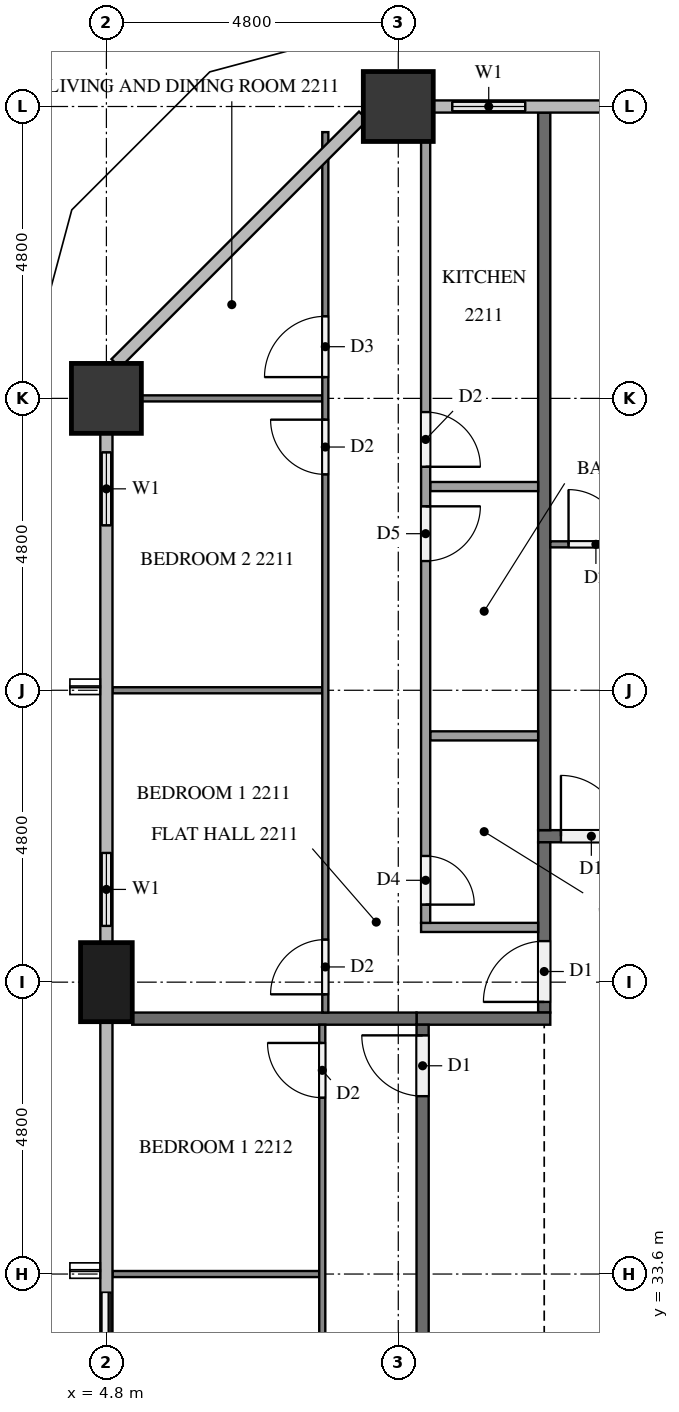
"""IFC4 building model, lengths in metres.
Left out: names, types, materials, properties, quantities, classifications, styles, units other than length and angle.
Written with IfcOpenShell. Run it as: python <this file> out.ifc"""

import sys

from ifc_helpers import new_model, si_unit, direction, frame, frame_2d, origin, origin_2d, place, context, subcontext, project, spatial, rectangle, extrude, element, fill, save


model = new_model("IFC4")
c1 = context("Model", 3, precision=1e-05, world=origin(), true_north=direction((0.0, 1.0)))
c2 = subcontext(c1, "Body", "Model", "MODEL_VIEW")
j1 = project(units=[si_unit("LENGTHUNIT", "METRE"), si_unit("PLANEANGLEUNIT", "RADIAN")], contexts=[c1])
p1 = place(None, origin())
s1 = spatial("IfcSite", under=j1, at=p1, CompositionType="ELEMENT")
p2 = place(p1, origin())
s2 = spatial("IfcBuilding", under=s1, at=p2, CompositionType="ELEMENT")
p3 = place(p2, frame((0.0, 0.0, 89.2)))
s3 = spatial("IfcBuildingStorey", under=s2, at=p3, CompositionType="ELEMENT", Elevation=89.2)
for number, where, z_axis, x_axis in (
    (1, (9.6, 52.8, 0.0), (0.0, 0.0, 1.0), (1.0, 0.0, 0.0)),
    (2, (4.8, 48.0, 0.0), (0.0, 0.0, 1.0), (1.0, 0.0, 0.0)),
):
    element("IfcColumn", number, at=place(p3, frame(where, z_axis=z_axis, x_axis=x_axis)), inside=s3, PredefinedType="COLUMN", context=c2, shape_type="SweptSolid", body=[
        extrude(rectangle(XDim=1.15, YDim=1.15, at=origin_2d()), origin(), (0.0, 0.0, 1.0), 3.2),
    ])
p4 = place(p3, frame((4.8, 38.4, 0.0), z_axis=(0.0, 0.0, 1.0), x_axis=(0.0, 1.0, 0.0)))
e3 = element("IfcColumn", 3, at=p4, inside=s3, PredefinedType="COLUMN", context=c2, shape_type="SweptSolid", body=[
    extrude(rectangle(XDim=1.3, YDim=0.85, at=origin_2d()), origin(), (0.0, 0.0, 1.0), 3.2),
])
p5 = place(p3, frame((12.0, 52.8, 0.0), z_axis=(0.0, 0.0, 1.0), x_axis=(-1.0, 0.0, 0.0)))
e4 = element("IfcWall", 4, at=p5, inside=s3, PredefinedType="SOLIDWALL", context=c2, shape_type="SweptSolid", body=[
    extrude(rectangle(XDim=1.825, YDim=0.15, at=frame_2d((0.913, 0.0))), origin(), (0.0, 0.0, 1.0), 3.2),
])
p6 = place(p5, frame((0.312, 0.0, 0.9)))
e5 = element("IfcOpeningElement", 5, at=p6, cuts=e4, PredefinedType="OPENING", context=c2, shape_type="SweptSolid", body=[
    extrude(rectangle(XDim=1.2, YDim=1.4, at=frame_2d((0.6, 0.7))), frame((0.0, 0.085, 0.0), z_axis=(0.0, -1.0, 0.0), x_axis=(1.0, 0.0, 0.0)), (0.0, 0.0, 1.0), 0.17),
])
p7 = place(p3, frame((4.8, 47.425, 0.0), z_axis=(0.0, 0.0, 1.0), x_axis=(0.0, -1.0, 0.0)))
e6 = element("IfcWall", 6, at=p7, inside=s3, PredefinedType="SOLIDWALL", context=c2, shape_type="SweptSolid", body=[
    extrude(rectangle(XDim=1.825, YDim=0.15, at=frame_2d((0.913, 0.0))), origin(), (0.0, 0.0, 1.0), 3.2),
])
p8 = place(p7, frame((0.312, 0.0, 0.9)))
e7 = element("IfcOpeningElement", 7, at=p8, cuts=e6, PredefinedType="OPENING", context=c2, shape_type="SweptSolid", body=[
    extrude(rectangle(XDim=1.2, YDim=1.4, at=frame_2d((0.6, 0.7))), frame((0.0, 0.085, 0.0), z_axis=(0.0, -1.0, 0.0), x_axis=(1.0, 0.0, 0.0)), (0.0, 0.0, 1.0), 0.17),
])
p9 = place(p3, frame((4.8, 40.8, 0.0), z_axis=(0.0, 0.0, 1.0), x_axis=(0.0, -1.0, 0.0)))
e8 = element("IfcWall", 8, at=p9, inside=s3, PredefinedType="SOLIDWALL", context=c2, shape_type="SweptSolid", body=[
    extrude(rectangle(XDim=1.75, YDim=0.15, at=frame_2d((0.875, 0.0))), origin(), (0.0, 0.0, 1.0), 3.2),
])
p10 = place(p9, frame((0.275, 0.0, 0.9)))
e9 = element("IfcOpeningElement", 9, at=p10, cuts=e8, PredefinedType="OPENING", context=c2, shape_type="SweptSolid", body=[
    extrude(rectangle(XDim=1.2, YDim=1.4, at=frame_2d((0.6, 0.7))), frame((0.0, 0.085, 0.0), z_axis=(0.0, -1.0, 0.0), x_axis=(1.0, 0.0, 0.0)), (0.0, 0.0, 1.0), 0.17),
])
p11 = place(p3, frame((4.8, 33.6, 0.0), z_axis=(0.0, 0.0, 1.0), x_axis=(0.0, -1.0, 0.0)))
e10 = element("IfcWall", 10, at=p11, inside=s3, PredefinedType="SOLIDWALL", context=c2, shape_type="SweptSolid", body=[
    extrude(rectangle(XDim=2.4, YDim=0.15, at=frame_2d((1.2, 0.0))), origin(), (0.0, 0.0, 1.0), 3.2),
])
p12 = place(p11, frame((0.3, 0.0, 0.0)))
e11 = element("IfcOpeningElement", 11, at=p12, cuts=e10, PredefinedType="OPENING", context=c2, shape_type="SweptSolid", body=[
    extrude(rectangle(XDim=1.8, YDim=2.4, at=frame_2d((0.9, 1.2))), frame((0.0, 0.085, 0.0), z_axis=(0.0, -1.0, 0.0), x_axis=(1.0, 0.0, 0.0)), (0.0, 0.0, 1.0), 0.17),
])
p13 = place(p3, frame((11.9, 40.8, 0.0), z_axis=(0.0, 0.0, 1.0), x_axis=(1.0, 0.0, 0.0)))
e12 = element("IfcWall", 12, at=p13, inside=s3, PredefinedType="PARTITIONING", context=c2, shape_type="SweptSolid", body=[
    extrude(rectangle(XDim=38.6, YDim=0.2, at=frame_2d((19.3, 0.0))), origin(), (0.0, 0.0, 1.0), 3.2),
])
p14 = place(p13, frame((31.575, 0.0, 0.0)))
e13 = element("IfcOpeningElement", 13, at=p14, cuts=e12, PredefinedType="OPENING", context=c2, shape_type="SweptSolid", body=[
    extrude(rectangle(XDim=1.0, YDim=2.1, at=frame_2d((0.5, 1.05))), frame((0.0, 0.11, 0.0), z_axis=(0.0, -1.0, 0.0), x_axis=(1.0, 0.0, 0.0)), (0.0, 0.0, 1.0), 0.22),
])
p15 = place(p13, frame((14.775, 0.0, 0.0)))
e14 = element("IfcOpeningElement", 14, at=p15, cuts=e12, PredefinedType="OPENING", context=c2, shape_type="SweptSolid", body=[
    extrude(rectangle(XDim=1.0, YDim=2.1, at=frame_2d((0.5, 1.05))), frame((0.0, 0.11, 0.0), z_axis=(0.0, -1.0, 0.0), x_axis=(1.0, 0.0, 0.0)), (0.0, 0.0, 1.0), 0.22),
])
p16 = place(p13, frame((0.375, 0.0, 0.0)))
e15 = element("IfcOpeningElement", 15, at=p16, cuts=e12, PredefinedType="OPENING", context=c2, shape_type="SweptSolid", body=[
    extrude(rectangle(XDim=1.0, YDim=2.1, at=frame_2d((0.5, 1.05))), frame((0.0, 0.11, 0.0), z_axis=(0.0, -1.0, 0.0), x_axis=(1.0, 0.0, 0.0)), (0.0, 0.0, 1.0), 0.22),
])
p17 = place(p3, frame((12.0, 37.9, 0.0), z_axis=(0.0, 0.0, 1.0), x_axis=(0.0, 1.0, 0.0)))
e16 = element("IfcWall", 16, at=p17, inside=s3, PredefinedType="PARTITIONING", context=c2, shape_type="SweptSolid", body=[
    extrude(rectangle(XDim=2.8, YDim=0.2, at=frame_2d((1.4, 0.0))), origin(), (0.0, 0.0, 1.0), 3.2),
])
p18 = place(p17, frame((0.175, 0.0, 0.0)))
e17 = element("IfcOpeningElement", 17, at=p18, cuts=e16, PredefinedType="OPENING", context=c2, shape_type="SweptSolid", body=[
    extrude(rectangle(XDim=1.0, YDim=2.1, at=frame_2d((0.5, 1.05))), frame((0.0, 0.11, 0.0), z_axis=(0.0, -1.0, 0.0), x_axis=(1.0, 0.0, 0.0)), (0.0, 0.0, 1.0), 0.22),
])
p19 = place(p3, frame((12.1, 37.8, 0.0), z_axis=(0.0, 0.0, 1.0), x_axis=(-1.0, 0.0, 0.0)))
e18 = element("IfcWall", 18, at=p19, inside=s3, PredefinedType="PARTITIONING", context=c2, shape_type="SweptSolid", body=[
    extrude(rectangle(XDim=2.2, YDim=0.2, at=frame_2d((1.1, 0.0))), origin(), (0.0, 0.0, 1.0), 3.2),
])
p20 = place(p3, frame((10.0, 15.1, 0.0), z_axis=(0.0, 0.0, 1.0), x_axis=(0.0, 1.0, 0.0)))
e19 = element("IfcWall", 19, at=p20, inside=s3, PredefinedType="PARTITIONING", context=c2, shape_type="SweptSolid", body=[
    extrude(rectangle(XDim=22.6, YDim=0.2, at=frame_2d((11.3, 0.0))), origin(), (0.0, 0.0, 1.0), 3.2),
])
p21 = place(p20, frame((21.425, 0.0, 0.0)))
e20 = element("IfcOpeningElement", 20, at=p21, cuts=e19, PredefinedType="OPENING", context=c2, shape_type="SweptSolid", body=[
    extrude(rectangle(XDim=1.0, YDim=2.1, at=frame_2d((0.5, 1.05))), frame((0.0, 0.11, 0.0), z_axis=(0.0, -1.0, 0.0), x_axis=(1.0, 0.0, 0.0)), (0.0, 0.0, 1.0), 0.22),
])
p22 = place(p3, frame((12.0, 52.7, 0.0), z_axis=(0.0, 0.0, 1.0), x_axis=(0.0, -1.0, 0.0)))
e21 = element("IfcWall", 21, at=p22, inside=s3, PredefinedType="PARTITIONING", context=c2, shape_type="SweptSolid", body=[
    extrude(rectangle(XDim=11.8, YDim=0.2, at=frame_2d((5.9, 0.0))), origin(), (0.0, 0.0, 1.0), 3.2),
])
p23 = place(p3, frame((5.225, 37.8, 0.0), z_axis=(0.0, 0.0, 1.0), x_axis=(1.0, 0.0, 0.0)))
e22 = element("IfcWall", 22, at=p23, inside=s3, PredefinedType="PARTITIONING", context=c2, shape_type="SweptSolid", body=[
    extrude(rectangle(XDim=4.675, YDim=0.2, at=frame_2d((2.337, 0.0))), origin(), (0.0, 0.0, 1.0), 3.2),
])
p24 = place(p3, frame((12.1, 45.6, 0.0), z_axis=(0.0, 0.0, 1.0), x_axis=(1.0, 0.0, 0.0)))
e23 = element("IfcWall", 23, at=p24, inside=s3, PredefinedType="PARTITIONING", context=c2, shape_type="SweptSolid", body=[
    extrude(rectangle(XDim=14.2, YDim=0.1, at=frame_2d((7.1, 0.0))), origin(), (0.0, 0.0, 1.0), 3.2),
])
p25 = place(p24, frame((0.3, 0.0, 0.0)))
e24 = element("IfcOpeningElement", 24, at=p25, cuts=e23, PredefinedType="OPENING", context=c2, shape_type="SweptSolid", body=[
    extrude(rectangle(XDim=0.9, YDim=2.1, at=frame_2d((0.45, 1.05))), frame((0.0, 0.06, 0.0), z_axis=(0.0, -1.0, 0.0), x_axis=(1.0, 0.0, 0.0)), (0.0, 0.0, 1.0), 0.12),
])
p26 = place(p24, frame((8.15, 0.0, 0.0)))
e25 = element("IfcOpeningElement", 25, at=p26, cuts=e23, PredefinedType="OPENING", context=c2, shape_type="SweptSolid", body=[
    extrude(rectangle(XDim=1.0, YDim=2.1, at=frame_2d((0.5, 1.05))), frame((0.0, 0.06, 0.0), z_axis=(0.0, -1.0, 0.0), x_axis=(1.0, 0.0, 0.0)), (0.0, 0.0, 1.0), 0.12),
])
p27 = place(p24, frame((9.85, 0.0, 0.0)))
e26 = element("IfcOpeningElement", 26, at=p27, cuts=e23, PredefinedType="OPENING", context=c2, shape_type="SweptSolid", body=[
    extrude(rectangle(XDim=0.9, YDim=2.1, at=frame_2d((0.45, 1.05))), frame((0.0, 0.06, 0.0), z_axis=(0.0, -1.0, 0.0), x_axis=(1.0, 0.0, 0.0)), (0.0, 0.0, 1.0), 0.12),
])
p28 = place(p3, frame((8.35, 43.2, 0.0), z_axis=(0.0, 0.0, 1.0), x_axis=(-1.0, 0.0, 0.0)))
e27 = element("IfcWall", 27, at=p28, inside=s3, PredefinedType="PARTITIONING", context=c2, shape_type="SweptSolid", body=[
    extrude(rectangle(XDim=3.45, YDim=0.1, at=frame_2d((1.725, 0.0))), origin(), (0.0, 0.0, 1.0), 3.2),
])
p29 = place(p3, frame((8.35, 48.0, 0.0), z_axis=(0.0, 0.0, 1.0), x_axis=(-1.0, 0.0, 0.0)))
e28 = element("IfcWall", 28, at=p29, inside=s3, PredefinedType="PARTITIONING", context=c2, shape_type="SweptSolid", body=[
    extrude(rectangle(XDim=2.975, YDim=0.1, at=frame_2d((1.488, 0.0))), origin(), (0.0, 0.0, 1.0), 3.2),
])
p30 = place(p3, frame((8.4, 37.9, 0.0), z_axis=(0.0, 0.0, 1.0), x_axis=(0.0, 1.0, 0.0)))
e29 = element("IfcWall", 29, at=p30, inside=s3, PredefinedType="PARTITIONING", context=c2, shape_type="SweptSolid", body=[
    extrude(rectangle(XDim=14.479, YDim=0.1, at=frame_2d((7.239, 0.0))), origin(), (0.0, 0.0, 1.0), 3.2),
])
p31 = place(p30, frame((0.3, 0.0, 0.0)))
e30 = element("IfcOpeningElement", 30, at=p31, cuts=e29, PredefinedType="OPENING", context=c2, shape_type="SweptSolid", body=[
    extrude(rectangle(XDim=0.9, YDim=2.1, at=frame_2d((0.45, 1.05))), frame((0.0, 0.06, 0.0), z_axis=(0.0, -1.0, 0.0), x_axis=(1.0, 0.0, 0.0)), (0.0, 0.0, 1.0), 0.12),
])
p32 = place(p30, frame((8.85, 0.0, 0.0)))
e31 = element("IfcOpeningElement", 31, at=p32, cuts=e29, PredefinedType="OPENING", context=c2, shape_type="SweptSolid", body=[
    extrude(rectangle(XDim=0.9, YDim=2.1, at=frame_2d((0.45, 1.05))), frame((0.0, 0.06, 0.0), z_axis=(0.0, -1.0, 0.0), x_axis=(1.0, 0.0, 0.0)), (0.0, 0.0, 1.0), 0.12),
])
p33 = place(p30, frame((10.45, 0.0, 0.0)))
e32 = element("IfcOpeningElement", 32, at=p33, cuts=e29, PredefinedType="OPENING", context=c2, shape_type="SweptSolid", body=[
    extrude(rectangle(XDim=1.0, YDim=2.1, at=frame_2d((0.5, 1.05))), frame((0.0, 0.06, 0.0), z_axis=(0.0, -1.0, 0.0), x_axis=(1.0, 0.0, 0.0)), (0.0, 0.0, 1.0), 0.12),
])
for number, where, z_axis, x_axis in (
    (33, (11.9, 42.45, 0.0), (0.0, 0.0, 1.0), (-1.0, 0.0, 0.0)),
    (34, (11.9, 46.55, 0.0), (0.0, 0.0, 1.0), (-1.0, 0.0, 0.0)),
):
    element("IfcWall", number, at=place(p3, frame(where, z_axis=z_axis, x_axis=x_axis)), inside=s3, PredefinedType="PARTITIONING", context=c2, shape_type="SweptSolid", body=[
        extrude(rectangle(XDim=1.775, YDim=0.15, at=frame_2d((0.887, 0.0))), origin(), (0.0, 0.0, 1.0), 3.2),
    ])
p34 = place(p3, frame((11.9, 39.3, 0.0), z_axis=(0.0, 0.0, 1.0), x_axis=(-1.0, 0.0, 0.0)))
e35 = element("IfcWall", 35, at=p34, inside=s3, PredefinedType="PARTITIONING", context=c2, shape_type="SweptSolid", body=[
    extrude(rectangle(XDim=1.925, YDim=0.15, at=frame_2d((0.962, 0.0))), origin(), (0.0, 0.0, 1.0), 3.2),
])
p35 = place(p3, frame((10.05, 52.225, 0.0), z_axis=(0.0, 0.0, 1.0), x_axis=(0.0, -1.0, 0.0)))
e36 = element("IfcWall", 36, at=p35, inside=s3, PredefinedType="PARTITIONING", context=c2, shape_type="SweptSolid", body=[
    extrude(rectangle(XDim=12.85, YDim=0.15, at=frame_2d((6.425, 0.0))), origin(), (0.0, 0.0, 1.0), 3.2),
])
p36 = place(p35, frame((11.75, 0.0, 0.0)))
e37 = element("IfcOpeningElement", 37, at=p36, cuts=e36, PredefinedType="OPENING", context=c2, shape_type="SweptSolid", body=[
    extrude(rectangle(XDim=0.8, YDim=2.1, at=frame_2d((0.4, 1.05))), frame((0.0, 0.085, 0.0), z_axis=(0.0, -1.0, 0.0), x_axis=(1.0, 0.0, 0.0)), (0.0, 0.0, 1.0), 0.17),
])
p37 = place(p35, frame((6.0, 0.0, 0.0)))
e38 = element("IfcOpeningElement", 38, at=p37, cuts=e36, PredefinedType="OPENING", context=c2, shape_type="SweptSolid", body=[
    extrude(rectangle(XDim=0.9, YDim=2.1, at=frame_2d((0.45, 1.05))), frame((0.0, 0.085, 0.0), z_axis=(0.0, -1.0, 0.0), x_axis=(1.0, 0.0, 0.0)), (0.0, 0.0, 1.0), 0.17),
])
p38 = place(p35, frame((4.45, 0.0, 0.0)))
e39 = element("IfcOpeningElement", 39, at=p38, cuts=e36, PredefinedType="OPENING", context=c2, shape_type="SweptSolid", body=[
    extrude(rectangle(XDim=0.9, YDim=2.1, at=frame_2d((0.45, 1.05))), frame((0.0, 0.085, 0.0), z_axis=(0.0, -1.0, 0.0), x_axis=(1.0, 0.0, 0.0)), (0.0, 0.0, 1.0), 0.17),
])
p39 = place(p3, frame((8.3, 33.6, 0.0), z_axis=(0.0, 0.0, 1.0), x_axis=(-1.0, 0.0, 0.0)))
e40 = element("IfcWall", 40, at=p39, inside=s3, PredefinedType="PARTITIONING", context=c2, shape_type="SweptSolid", body=[
    extrude(rectangle(XDim=3.4, YDim=0.1, at=frame_2d((1.7, 0.0))), origin(), (0.0, 0.0, 1.0), 3.2),
])
p40 = place(p3, frame((8.35, 15.1, 0.0), z_axis=(0.0, 0.0, 1.0), x_axis=(0.0, 1.0, 0.0)))
e41 = element("IfcWall", 41, at=p40, inside=s3, PredefinedType="PARTITIONING", context=c2, shape_type="SweptSolid", body=[
    extrude(rectangle(XDim=22.6, YDim=0.1, at=frame_2d((11.3, 0.0))), origin(), (0.0, 0.0, 1.0), 3.2),
])
p41 = place(p40, frame((21.4, 0.0, 0.0)))
e42 = element("IfcOpeningElement", 42, at=p41, cuts=e41, PredefinedType="OPENING", context=c2, shape_type="SweptSolid", body=[
    extrude(rectangle(XDim=0.9, YDim=2.1, at=frame_2d((0.45, 1.05))), frame((0.0, 0.06, 0.0), z_axis=(0.0, -1.0, 0.0), x_axis=(1.0, 0.0, 0.0)), (0.0, 0.0, 1.0), 0.12),
])
p42 = place(p40, frame((11.65, 0.0, 0.0)))
e43 = element("IfcOpeningElement", 43, at=p42, cuts=e41, PredefinedType="OPENING", context=c2, shape_type="SweptSolid", body=[
    extrude(rectangle(XDim=1.0, YDim=2.1, at=frame_2d((0.5, 1.05))), frame((0.0, 0.06, 0.0), z_axis=(0.0, -1.0, 0.0), x_axis=(1.0, 0.0, 0.0)), (0.0, 0.0, 1.0), 0.12),
])
p43 = place(p40, frame((10.05, 0.0, 0.0)))
e44 = element("IfcOpeningElement", 44, at=p43, cuts=e41, PredefinedType="OPENING", context=c2, shape_type="SweptSolid", body=[
    extrude(rectangle(XDim=0.9, YDim=2.1, at=frame_2d((0.45, 1.05))), frame((0.0, 0.06, 0.0), z_axis=(0.0, -1.0, 0.0), x_axis=(1.0, 0.0, 0.0)), (0.0, 0.0, 1.0), 0.12),
])
p44 = place(p40, frame((4.45, 0.0, 0.0)))
e45 = element("IfcOpeningElement", 45, at=p44, cuts=e41, PredefinedType="OPENING", context=c2, shape_type="SweptSolid", body=[
    extrude(rectangle(XDim=0.9, YDim=2.1, at=frame_2d((0.45, 1.05))), frame((0.0, 0.06, 0.0), z_axis=(0.0, -1.0, 0.0), x_axis=(1.0, 0.0, 0.0)), (0.0, 0.0, 1.0), 0.12),
])
p45 = place(p40, frame((2.85, 0.0, 0.0)))
e46 = element("IfcOpeningElement", 46, at=p45, cuts=e41, PredefinedType="OPENING", context=c2, shape_type="SweptSolid", body=[
    extrude(rectangle(XDim=0.9, YDim=2.1, at=frame_2d((0.45, 1.05))), frame((0.0, 0.06, 0.0), z_axis=(0.0, -1.0, 0.0), x_axis=(1.0, 0.0, 0.0)), (0.0, 0.0, 1.0), 0.12),
])
p46 = place(p40, frame((0.3, 0.0, 0.0)))
e47 = element("IfcOpeningElement", 47, at=p46, cuts=e41, PredefinedType="OPENING", context=c2, shape_type="SweptSolid", body=[
    extrude(rectangle(XDim=0.8, YDim=2.1, at=frame_2d((0.4, 1.05))), frame((0.0, 0.06, 0.0), z_axis=(0.0, -1.0, 0.0), x_axis=(1.0, 0.0, 0.0)), (0.0, 0.0, 1.0), 0.12),
])
p47 = place(p6, origin())
e48 = element("IfcWindow", 48, at=p47, inside=s3, PartitioningType="SINGLE_PANEL", PredefinedType="WINDOW", context=c2, shape_type="SweptSolid", body=[
    extrude(rectangle(XDim=1.2, YDim=1.4, at=frame_2d((0.6, 0.7))), frame((0.0, 0.03, 0.0), z_axis=(0.0, -1.0, 0.0), x_axis=(1.0, 0.0, 0.0)), (0.0, 0.0, 1.0), 0.06),
])
fill(e5, e48)
p48 = place(p8, origin())
e49 = element("IfcWindow", 49, at=p48, inside=s3, PartitioningType="SINGLE_PANEL", PredefinedType="WINDOW", context=c2, shape_type="SweptSolid", body=[
    extrude(rectangle(XDim=1.2, YDim=1.4, at=frame_2d((0.6, 0.7))), frame((0.0, 0.03, 0.0), z_axis=(0.0, -1.0, 0.0), x_axis=(1.0, 0.0, 0.0)), (0.0, 0.0, 1.0), 0.06),
])
fill(e7, e49)
p49 = place(p10, origin())
e50 = element("IfcWindow", 50, at=p49, inside=s3, PartitioningType="SINGLE_PANEL", PredefinedType="WINDOW", context=c2, shape_type="SweptSolid", body=[
    extrude(rectangle(XDim=1.2, YDim=1.4, at=frame_2d((0.6, 0.7))), frame((0.0, 0.03, 0.0), z_axis=(0.0, -1.0, 0.0), x_axis=(1.0, 0.0, 0.0)), (0.0, 0.0, 1.0), 0.06),
])
fill(e9, e50)
p50 = place(p12, origin())
e51 = element("IfcDoor", 51, at=p50, inside=s3, OperationType="SLIDING_TO_LEFT", PredefinedType="DOOR", context=c2, shape_type="SweptSolid", body=[
    extrude(rectangle(XDim=1.8, YDim=2.4, at=frame_2d((0.9, 1.2))), frame((0.0, 0.025, 0.0), z_axis=(0.0, -1.0, 0.0), x_axis=(1.0, 0.0, 0.0)), (0.0, 0.0, 1.0), 0.05),
])
fill(e11, e51)
p51 = place(p16, origin())
e52 = element("IfcDoor", 52, at=p51, inside=s3, OperationType="SINGLE_SWING_LEFT", PredefinedType="DOOR", context=c2, shape_type="SweptSolid", body=[
    extrude(rectangle(XDim=1.0, YDim=2.1, at=frame_2d((0.5, 1.05))), frame((0.0, 0.025, 0.0), z_axis=(0.0, -1.0, 0.0), x_axis=(1.0, 0.0, 0.0)), (0.0, 0.0, 1.0), 0.05),
])
fill(e15, e52)
p52 = place(p18, origin())
e53 = element("IfcDoor", 53, at=p52, inside=s3, OperationType="SINGLE_SWING_LEFT", PredefinedType="DOOR", context=c2, shape_type="SweptSolid", body=[
    extrude(rectangle(XDim=1.0, YDim=2.1, at=frame_2d((0.5, 1.05))), frame((0.0, 0.025, 0.0), z_axis=(0.0, -1.0, 0.0), x_axis=(1.0, 0.0, 0.0)), (0.0, 0.0, 1.0), 0.05),
])
fill(e17, e53)
p53 = place(p21, origin())
e54 = element("IfcDoor", 54, at=p53, inside=s3, OperationType="SINGLE_SWING_RIGHT", PredefinedType="DOOR", context=c2, shape_type="SweptSolid", body=[
    extrude(rectangle(XDim=1.0, YDim=2.1, at=frame_2d((0.5, 1.05))), frame((0.0, 0.025, 0.0), z_axis=(0.0, -1.0, 0.0), x_axis=(1.0, 0.0, 0.0)), (0.0, 0.0, 1.0), 0.05),
])
fill(e20, e54)
p54 = place(p25, origin())
e55 = element("IfcDoor", 55, at=p54, inside=s3, OperationType="SINGLE_SWING_LEFT", PredefinedType="DOOR", context=c2, shape_type="SweptSolid", body=[
    extrude(rectangle(XDim=0.9, YDim=2.1, at=frame_2d((0.45, 1.05))), frame((0.0, 0.025, 0.0), z_axis=(0.0, -1.0, 0.0), x_axis=(1.0, 0.0, 0.0)), (0.0, 0.0, 1.0), 0.05),
])
fill(e24, e55)
p55 = place(p31, origin())
e56 = element("IfcDoor", 56, at=p55, inside=s3, OperationType="SINGLE_SWING_LEFT", PredefinedType="DOOR", context=c2, shape_type="SweptSolid", body=[
    extrude(rectangle(XDim=0.9, YDim=2.1, at=frame_2d((0.45, 1.05))), frame((0.0, 0.025, 0.0), z_axis=(0.0, -1.0, 0.0), x_axis=(1.0, 0.0, 0.0)), (0.0, 0.0, 1.0), 0.05),
])
fill(e30, e56)
p56 = place(p32, origin())
e57 = element("IfcDoor", 57, at=p56, inside=s3, OperationType="SINGLE_SWING_RIGHT", PredefinedType="DOOR", context=c2, shape_type="SweptSolid", body=[
    extrude(rectangle(XDim=0.9, YDim=2.1, at=frame_2d((0.45, 1.05))), frame((0.0, 0.025, 0.0), z_axis=(0.0, -1.0, 0.0), x_axis=(1.0, 0.0, 0.0)), (0.0, 0.0, 1.0), 0.05),
])
fill(e31, e57)
p57 = place(p33, origin())
e58 = element("IfcDoor", 58, at=p57, inside=s3, OperationType="SINGLE_SWING_LEFT", PredefinedType="DOOR", context=c2, shape_type="SweptSolid", body=[
    extrude(rectangle(XDim=1.0, YDim=2.1, at=frame_2d((0.5, 1.05))), frame((0.0, 0.025, 0.0), z_axis=(0.0, -1.0, 0.0), x_axis=(1.0, 0.0, 0.0)), (0.0, 0.0, 1.0), 0.05),
])
fill(e32, e58)
p58 = place(p36, origin())
e59 = element("IfcDoor", 59, at=p58, inside=s3, OperationType="SINGLE_SWING_RIGHT", PredefinedType="DOOR", context=c2, shape_type="SweptSolid", body=[
    extrude(rectangle(XDim=0.8, YDim=2.1, at=frame_2d((0.4, 1.05))), frame((0.0, 0.025, 0.0), z_axis=(0.0, -1.0, 0.0), x_axis=(1.0, 0.0, 0.0)), (0.0, 0.0, 1.0), 0.05),
])
fill(e37, e59)
p59 = place(p37, origin())
e60 = element("IfcDoor", 60, at=p59, inside=s3, OperationType="SINGLE_SWING_LEFT", PredefinedType="DOOR", context=c2, shape_type="SweptSolid", body=[
    extrude(rectangle(XDim=0.9, YDim=2.1, at=frame_2d((0.45, 1.05))), frame((0.0, 0.025, 0.0), z_axis=(0.0, -1.0, 0.0), x_axis=(1.0, 0.0, 0.0)), (0.0, 0.0, 1.0), 0.05),
])
fill(e38, e60)
p60 = place(p38, origin())
e61 = element("IfcDoor", 61, at=p60, inside=s3, OperationType="SINGLE_SWING_RIGHT", PredefinedType="DOOR", context=c2, shape_type="SweptSolid", body=[
    extrude(rectangle(XDim=0.9, YDim=2.1, at=frame_2d((0.45, 1.05))), frame((0.0, 0.025, 0.0), z_axis=(0.0, -1.0, 0.0), x_axis=(1.0, 0.0, 0.0)), (0.0, 0.0, 1.0), 0.05),
])
fill(e39, e61)
p61 = place(p41, origin())
e62 = element("IfcDoor", 62, at=p61, inside=s3, OperationType="SINGLE_SWING_RIGHT", PredefinedType="DOOR", context=c2, shape_type="SweptSolid", body=[
    extrude(rectangle(XDim=0.9, YDim=2.1, at=frame_2d((0.45, 1.05))), frame((0.0, 0.025, 0.0), z_axis=(0.0, -1.0, 0.0), x_axis=(1.0, 0.0, 0.0)), (0.0, 0.0, 1.0), 0.05),
])
fill(e42, e62)
save(model, sys.argv[1])
